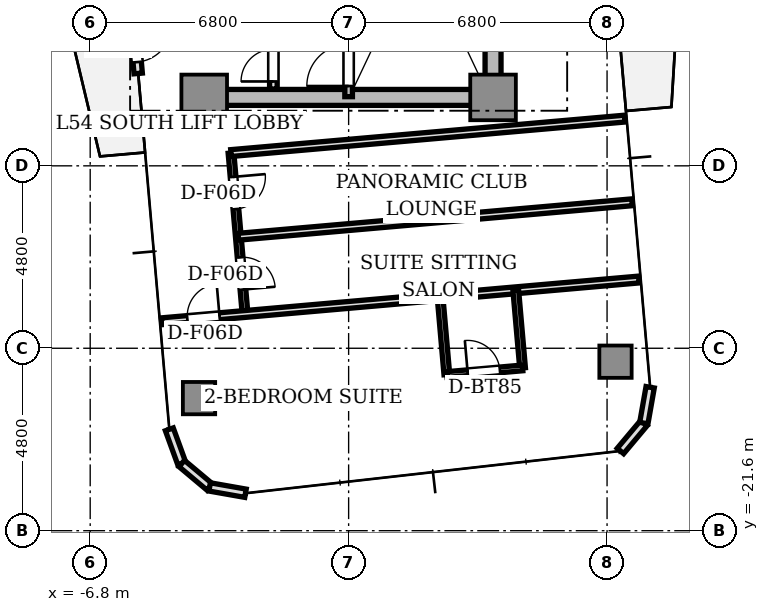
"""IFC4 building model, lengths in metres.
Left out: names, types, materials, properties, quantities, classifications, styles, units other than length and angle.
Written with IfcOpenShell. Run it as: python <this file> out.ifc"""

import sys

from ifc_helpers import new_model, si_unit, direction, frame, frame_2d, origin, origin_2d, place, context, subcontext, project, spatial, rectangle, extrude, source, transform, mapped, element, fill, save


model = new_model("IFC4")
c1 = context("Model", 3, precision=1e-05, world=origin(), true_north=direction((0.0, 1.0)))
c2 = subcontext(c1, "Body", "Model", "MODEL_VIEW")
j1 = project(units=[si_unit("LENGTHUNIT", "METRE"), si_unit("PLANEANGLEUNIT", "RADIAN")], contexts=[c1])
p1 = place(None, origin())
s1 = spatial("IfcSite", under=j1, at=p1, CompositionType="ELEMENT")
p2 = place(p1, origin())
s2 = spatial("IfcBuilding", under=s1, at=p2, CompositionType="ELEMENT")
p3 = place(p2, frame((0.0, 0.0, 195.3)))
s3 = spatial("IfcBuildingStorey", under=s2, at=p3, CompositionType="ELEMENT", Elevation=195.3)
p4 = place(p3, frame((-3.55, -10.2, 0.0), z_axis=(0.0, 0.0, 1.0), x_axis=(1.0, 0.0, 0.0)))
e1 = element("IfcWall", 1, at=p4, inside=s3, PredefinedType="SHEAR", context=c2, shape_type="SweptSolid", body=[
    extrude(rectangle(XDim=7.1, YDim=0.42, at=frame_2d((3.55, 0.0))), origin(), (0.0, 0.0, 1.0), 3.11),
])
p5 = place(p3, frame((3.8, -9.75, 0.0), z_axis=(0.0, 0.0, 1.0), x_axis=(0.0, 1.0, 0.0)))
e2 = element("IfcWall", 2, at=p5, inside=s3, PredefinedType="SHEAR", context=c2, shape_type="SweptSolid", body=[
    extrude(rectangle(XDim=6.9, YDim=0.42, at=frame_2d((3.45, 0.0))), origin(), (0.0, 0.0, 1.0), 3.11),
])
m1 = source(origin(), c2, "Body", "SweptSolid", [
    extrude(rectangle(XDim=1.2, YDim=1.2, at=origin_2d()), origin(), (0.0, 0.0, 1.0), 3.11),
])
for number, where, z_axis, x_axis in (
    (3, (-3.8, -10.2, 0.0), (0.0, 0.0, 1.0), (1.0, 0.0, 0.0)),
    (4, (3.8, -10.2, 0.0), (0.0, 0.0, 1.0), (1.0, 0.0, 0.0)),
):
    element("IfcColumn", number, at=place(p3, frame(where, z_axis=z_axis, x_axis=x_axis)), inside=s3, PredefinedType="COLUMN", context=c2, shape_type="MappedRepresentation", body=[
        mapped(m1, transform((0.0, 0.0, 0.0), scale=1.0)),
    ])
m2 = source(origin(), c2, "Body", "SweptSolid", [
    extrude(rectangle(XDim=0.85, YDim=0.85, at=origin_2d()), origin(), (0.0, 0.0, 1.0), 3.11),
])
for number, where, z_axis, x_axis in (
    (5, (-3.936, -18.112, 0.0), (0.0, 0.0, 1.0), (1.0, 0.0, 0.0)),
    (6, (7.022, -17.153, 0.0), (0.0, 0.0, 1.0), (1.0, 0.0, 0.0)),
):
    element("IfcColumn", number, at=place(p3, frame(where, z_axis=z_axis, x_axis=x_axis)), inside=s3, PredefinedType="COLUMN", context=c2, shape_type="MappedRepresentation", body=[
        mapped(m2, transform((0.0, 0.0, 0.0), scale=1.0)),
    ])
p6 = place(p3, frame((-5.772, -6.879, 0.0), z_axis=(0.0, 0.0, 1.0), x_axis=(0.087168071984, -0.996193619346, 0.0)))
e7 = element("IfcWall", 7, at=p6, inside=s3, PredefinedType="STANDARD", context=c2, shape_type="SweptSolid", body=[
    extrude(rectangle(XDim=2.7, YDim=0.22, at=frame_2d((1.35, 0.0))), origin(), (0.0, 0.0, 1.0), 3.11),
])
p7 = place(p6, frame((1.4, 0.0, 0.0)))
e8 = element("IfcOpeningElement", 8, at=p7, cuts=e7, PredefinedType="OPENING", context=c2, shape_type="SweptSolid", body=[
    extrude(rectangle(XDim=1.0, YDim=2.2, at=frame_2d((0.5, 1.1))), frame((0.0, 0.12, 0.0), z_axis=(0.0, -1.0, 0.0), x_axis=(1.0, 0.0, 0.0)), (0.0, 0.0, 1.0), 0.24),
])
p8 = place(p3, frame((-4.718, -18.933, 0.0), z_axis=(0.0, 0.0, 1.0), x_axis=(0.34188635151, -0.939741306239, 0.0)))
e9 = element("IfcWall", 9, at=p8, inside=s3, PredefinedType="STANDARD", context=c2, shape_type="SweptSolid", body=[
    extrude(rectangle(XDim=0.958, YDim=0.22, at=frame_2d((0.479, 0.0))), origin(), (0.0, 0.0, 1.0), 3.11),
])
for number, where, z_axis, x_axis in (
    (10, (-4.39, -19.833, 0.0), (0.0, 0.0, 1.0), (0.766, -0.643, 0.0)),
    (11, (-3.657, -20.449, 0.0), (0.0, 0.0, 1.0), (0.985, -0.174, 0.0)),
):
    element("IfcWall", number, at=place(p3, frame(where, z_axis=z_axis, x_axis=x_axis)), inside=s3, PredefinedType="STANDARD", context=c2, shape_type="SweptSolid", body=[
        extrude(rectangle(XDim=0.958, YDim=0.22, at=frame_2d((0.479, 0.0))), origin(), (0.0, 0.0, 1.0), 3.11),
    ])
for number, where, z_axis, x_axis in (
    (12, (7.152, -19.503, 0.0), (0.0, 0.0, 1.0), (0.643, 0.766, 0.0)),
    (13, (7.768, -18.769, 0.0), (0.0, 0.0, 1.0), (0.174, 0.985, 0.0)),
):
    element("IfcWall", number, at=place(p3, frame(where, z_axis=z_axis, x_axis=x_axis)), inside=s3, PredefinedType="STANDARD", context=c2, shape_type="SweptSolid", body=[
        extrude(rectangle(XDim=0.958, YDim=0.22, at=frame_2d((0.479, 0.0))), origin(), (0.0, 0.0, 1.0), 3.11),
    ])
p9 = place(p3, frame((0.0, -10.18, 0.0), z_axis=(0.0, 0.0, 1.0), x_axis=(0.0, 1.0, 0.0)))
e14 = element("IfcWall", 14, at=p9, inside=s3, PredefinedType="SOLIDWALL", context=c2, shape_type="SweptSolid", body=[
    extrude(rectangle(XDim=7.68, YDim=0.2, at=frame_2d((3.84, 0.0))), origin(), (0.0, 0.0, 1.0), 3.11),
])
p10 = place(p9, frame((0.28, 0.0, 0.0)))
e15 = element("IfcOpeningElement", 15, at=p10, cuts=e14, PredefinedType="OPENING", context=c2, shape_type="SweptSolid", body=[
    extrude(rectangle(XDim=1.1, YDim=2.15, at=frame_2d((0.55, 1.075))), frame((0.0, 0.11, 0.0), z_axis=(0.0, -1.0, 0.0), x_axis=(1.0, 0.0, 0.0)), (0.0, 0.0, 1.0), 0.22),
])
p11 = place(p3, frame((-1.98, -9.98, 0.0), z_axis=(0.0, 0.0, 1.0), x_axis=(0.0, 1.0, 0.0)))
e16 = element("IfcWall", 16, at=p11, inside=s3, PredefinedType="SOLIDWALL", context=c2, shape_type="SweptSolid", body=[
    extrude(rectangle(XDim=4.66, YDim=0.2, at=frame_2d((2.33, 0.0))), origin(), (0.0, 0.0, 1.0), 2.66),
])
p12 = place(p11, frame((0.2, 0.0, 0.0)))
e17 = element("IfcOpeningElement", 17, at=p12, cuts=e16, PredefinedType="OPENING", context=c2, shape_type="SweptSolid", body=[
    extrude(rectangle(XDim=0.85, YDim=2.1, at=frame_2d((0.425, 1.05))), frame((0.0, 0.11, 0.0), z_axis=(0.0, -1.0, 0.0), x_axis=(1.0, 0.0, 0.0)), (0.0, 0.0, 1.0), 0.22),
])
p13 = place(p3, frame((-3.095, -11.664, 0.0), z_axis=(0.0, 0.0, 1.0), x_axis=(0.087142722004, -0.996195837173, 0.0)))
e18 = element("IfcWall", 18, at=p13, inside=s3, PredefinedType="PARTITIONING", context=c2, shape_type="SweptSolid", body=[
    extrude(rectangle(XDim=4.25, YDim=0.15, at=frame_2d((2.125, 0.0))), origin(), (0.0, 0.0, 1.0), 2.66),
])
p14 = place(p13, frame((0.63, 0.0, 0.0)))
e19 = element("IfcOpeningElement", 19, at=p14, cuts=e18, PredefinedType="OPENING", context=c2, shape_type="SweptSolid", body=[
    extrude(rectangle(XDim=0.85, YDim=2.1, at=frame_2d((0.425, 1.05))), frame((0.0, 0.085, 0.0), z_axis=(0.0, -1.0, 0.0), x_axis=(1.0, 0.0, 0.0)), (0.0, 0.0, 1.0), 0.17),
])
p15 = place(p13, frame((2.755, 0.0, 0.0)))
e20 = element("IfcOpeningElement", 20, at=p15, cuts=e18, PredefinedType="OPENING", context=c2, shape_type="SweptSolid", body=[
    extrude(rectangle(XDim=0.85, YDim=2.1, at=frame_2d((0.425, 1.05))), frame((0.0, 0.085, 0.0), z_axis=(0.0, -1.0, 0.0), x_axis=(1.0, 0.0, 0.0)), (0.0, 0.0, 1.0), 0.17),
])
p16 = place(p3, frame((-3.095, -11.664, 0.0), z_axis=(0.0, 0.0, 1.0), x_axis=(0.996196061386, 0.087140158824, 0.0)))
e21 = element("IfcWall", 21, at=p16, inside=s3, PredefinedType="PARTITIONING", context=c2, shape_type="SweptSolid", body=[
    extrude(rectangle(XDim=10.4, YDim=0.18, at=frame_2d((5.2, 0.0))), origin(), (0.0, 0.0, 1.0), 2.66),
])
p17 = place(p3, frame((-2.903, -13.866, 0.0), z_axis=(0.0, 0.0, 1.0), x_axis=(0.996194201607, 0.087161417409, 0.0)))
e22 = element("IfcWall", 22, at=p17, inside=s3, PredefinedType="PARTITIONING", context=c2, shape_type="SweptSolid", body=[
    extrude(rectangle(XDim=10.4, YDim=0.18, at=frame_2d((5.2, 0.0))), origin(), (0.0, 0.0, 1.0), 2.66),
])
p18 = place(p3, frame((-4.917, -16.09, 0.0), z_axis=(0.0, 0.0, 1.0), x_axis=(0.996196619285, 0.087133780622, 0.0)))
e23 = element("IfcWall", 23, at=p18, inside=s3, PredefinedType="PARTITIONING", context=c2, shape_type="SweptSolid", body=[
    extrude(rectangle(XDim=12.6, YDim=0.18, at=frame_2d((6.3, 0.0))), origin(), (0.0, 0.0, 1.0), 2.66),
])
p19 = place(p18, frame((0.675, 0.0, 0.0)))
e24 = element("IfcOpeningElement", 24, at=p19, cuts=e23, PredefinedType="OPENING", context=c2, shape_type="SweptSolid", body=[
    extrude(rectangle(XDim=0.85, YDim=2.1, at=frame_2d((0.425, 1.05))), frame((0.0, 0.1, 0.0), z_axis=(0.0, -1.0, 0.0), x_axis=(1.0, 0.0, 0.0)), (0.0, 0.0, 1.0), 0.2),
])
for number, where, z_axis, x_axis in (
    (25, (4.398, -15.275, 0.0), (0.0, 0.0, 1.0), (0.087, -0.996, 0.0)),
    (26, (2.406, -15.449, 0.0), (0.0, 0.0, 1.0), (0.087, -0.996, 0.0)),
):
    element("IfcWall", number, at=place(p3, frame(where, z_axis=z_axis, x_axis=x_axis)), inside=s3, PredefinedType="PARTITIONING", context=c2, shape_type="SweptSolid", body=[
        extrude(rectangle(XDim=2.05, YDim=0.15, at=frame_2d((1.025, 0.0))), origin(), (0.0, 0.0, 1.0), 2.66),
    ])
p20 = place(p3, frame((2.584, -17.491, 0.0), z_axis=(0.0, 0.0, 1.0), x_axis=(0.99619464492, 0.087156350505, 0.0)))
e27 = element("IfcWall", 27, at=p20, inside=s3, PredefinedType="PARTITIONING", context=c2, shape_type="SweptSolid", body=[
    extrude(rectangle(XDim=2.0, YDim=0.15, at=frame_2d((1.0, 0.0))), origin(), (0.0, 0.0, 1.0), 2.63),
])
p21 = place(p20, frame((0.55, 0.0, 0.0)))
e28 = element("IfcOpeningElement", 28, at=p21, cuts=e27, PredefinedType="OPENING", context=c2, shape_type="SweptSolid", body=[
    extrude(rectangle(XDim=0.85, YDim=2.1, at=frame_2d((0.425, 1.05))), frame((0.0, 0.085, 0.0), z_axis=(0.0, -1.0, 0.0), x_axis=(1.0, 0.0, 0.0)), (0.0, 0.0, 1.0), 0.17),
])
m3 = source(origin(), c2, "Body", "SweptSolid", [
    extrude(rectangle(XDim=1.0, YDim=0.05, at=origin_2d()), origin(), (0.0, 0.0, 1.0), 2.2),
])
p22 = place(p7, frame((0.5, 0.0, 0.0)))
e29 = element("IfcDoor", 29, at=p22, inside=s3, OperationType="SINGLE_SWING_LEFT", PredefinedType="DOOR", context=c2, shape_type="MappedRepresentation", body=[
    mapped(m3, transform((0.0, 0.0, 0.0), scale=1.0)),
])
fill(e8, e29)
m4 = source(origin(), c2, "Body", "SweptSolid", [
    extrude(rectangle(XDim=1.1, YDim=0.05, at=origin_2d()), origin(), (0.0, 0.0, 1.0), 2.15),
])
p23 = place(p10, frame((0.55, 0.0, 0.0)))
e30 = element("IfcDoor", 30, at=p23, inside=s3, OperationType="SINGLE_SWING_LEFT", PredefinedType="DOOR", context=c2, shape_type="MappedRepresentation", body=[
    mapped(m4, transform((0.0, 0.0, 0.0), scale=1.0)),
])
fill(e15, e30)
m5 = source(origin(), c2, "Body", "SweptSolid", [
    extrude(rectangle(XDim=0.85, YDim=0.05, at=origin_2d()), origin(), (0.0, 0.0, 1.0), 2.1),
])
p24 = place(p12, frame((0.425, 0.0, 0.0)))
e31 = element("IfcDoor", 31, at=p24, inside=s3, OperationType="SINGLE_SWING_LEFT", PredefinedType="DOOR", context=c2, shape_type="MappedRepresentation", body=[
    mapped(m5, transform((0.0, 0.0, 0.0), scale=1.0)),
])
fill(e17, e31)
p25 = place(p14, frame((0.425, 0.0, 0.0)))
e32 = element("IfcDoor", 32, at=p25, inside=s3, OperationType="SINGLE_SWING_LEFT", PredefinedType="DOOR", context=c2, shape_type="MappedRepresentation", body=[
    mapped(m5, transform((0.0, 0.0, 0.0), scale=1.0)),
])
fill(e19, e32)
p26 = place(p15, frame((0.425, 0.0, 0.0)))
e33 = element("IfcDoor", 33, at=p26, inside=s3, OperationType="SINGLE_SWING_RIGHT", PredefinedType="DOOR", context=c2, shape_type="MappedRepresentation", body=[
    mapped(m5, transform((0.0, 0.0, 0.0), scale=1.0)),
])
fill(e20, e33)
p27 = place(p21, frame((0.425, 0.0, 0.0)))
e34 = element("IfcDoor", 34, at=p27, inside=s3, OperationType="SINGLE_SWING_LEFT", PredefinedType="DOOR", context=c2, shape_type="MappedRepresentation", body=[
    mapped(m5, transform((0.0, 0.0, 0.0), scale=1.0)),
])
fill(e28, e34)
p28 = place(p19, frame((0.425, 0.0, 0.0)))
e35 = element("IfcDoor", 35, at=p28, inside=s3, OperationType="SINGLE_SWING_RIGHT", PredefinedType="DOOR", context=c2, shape_type="MappedRepresentation", body=[
    mapped(m5, transform((0.0, 0.0, 0.0), scale=1.0)),
])
fill(e24, e35)
save(model, sys.argv[1])
